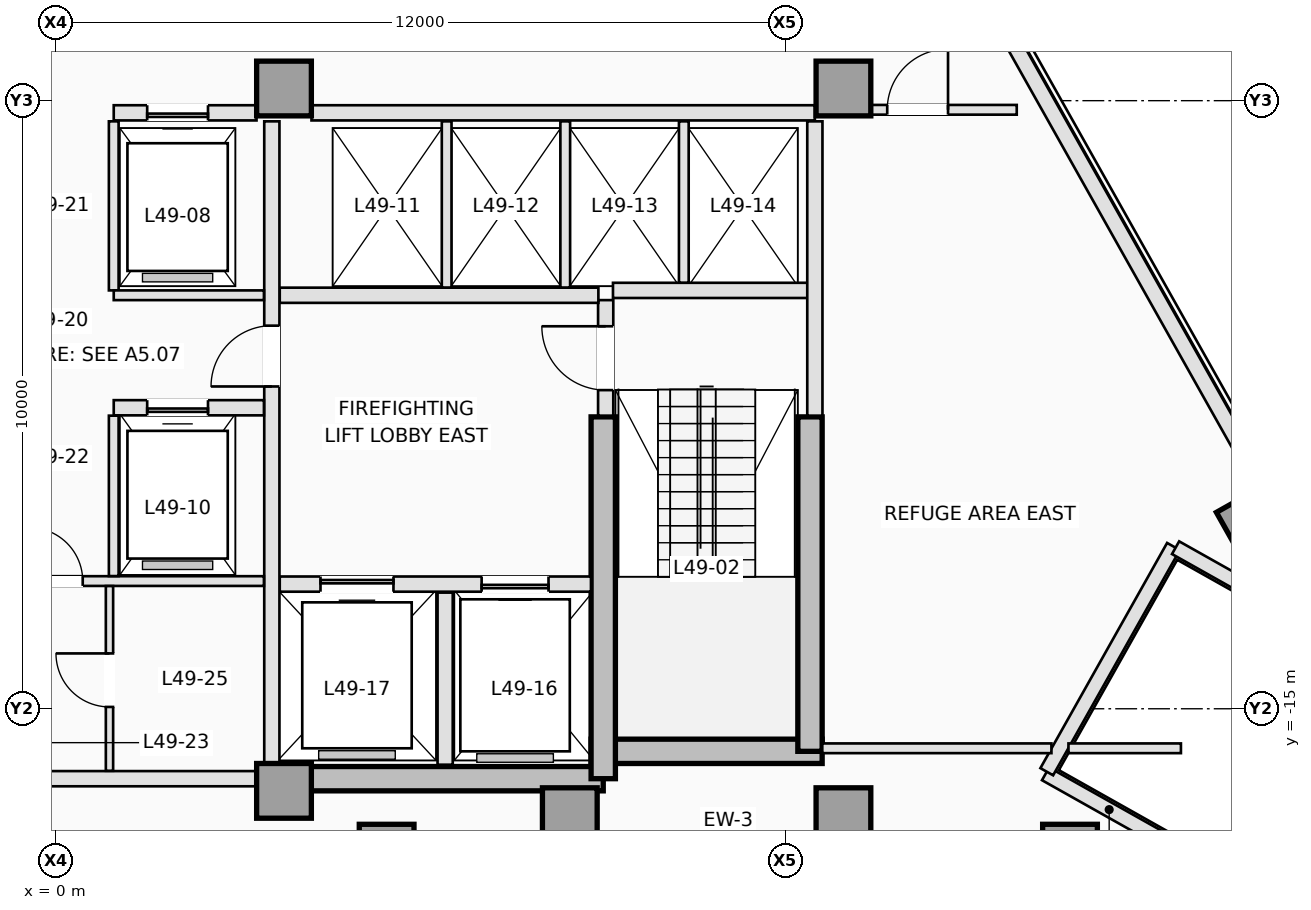
"""IFC4 building model, lengths in metres.
Left out: names, types, materials, properties, quantities, classifications, styles, units other than length and angle.
Written with IfcOpenShell. Run it as: python <this file> out.ifc"""

import sys

from ifc_helpers import new_model, si_unit, direction, frame, frame_2d, origin, origin_2d, place, context, subcontext, project, spatial, rectangle, extrude, element, fill, save


model = new_model("IFC4")
c1 = context("Model", 3, precision=1e-05, world=origin(), true_north=direction((0.0, 1.0)))
c2 = subcontext(c1, "Body", "Model", "MODEL_VIEW")
j1 = project(units=[si_unit("LENGTHUNIT", "METRE"), si_unit("PLANEANGLEUNIT", "RADIAN")], contexts=[c1])
p1 = place(None, origin())
s1 = spatial("IfcSite", under=j1, at=p1, CompositionType="ELEMENT")
p2 = place(p1, origin())
s2 = spatial("IfcBuilding", under=s1, at=p2, CompositionType="ELEMENT")
p3 = place(p2, frame((0.0, 0.0, 179.0)))
s3 = spatial("IfcBuildingStorey", under=s2, at=p3, CompositionType="ELEMENT", Elevation=179.0)
p4 = place(p3, frame((3.75, -16.15, 0.0), z_axis=(0.0, 0.0, 1.0), x_axis=(1.0, 0.0, 0.0)))
e1 = element("IfcWall", 1, at=p4, inside=s3, PredefinedType="SHEAR", context=c2, shape_type="SweptSolid", body=[
    extrude(rectangle(XDim=5.25, YDim=0.4, at=frame_2d((2.625, 0.0))), origin(), (0.0, 0.0, 1.0), 4.4),
])
p5 = place(p3, frame((8.8, -15.7, 0.0), z_axis=(0.0, 0.0, 1.0), x_axis=(1.0, 0.0, 0.0)))
e2 = element("IfcWall", 2, at=p5, inside=s3, PredefinedType="SHEAR", context=c2, shape_type="SweptSolid", body=[
    extrude(rectangle(XDim=3.8, YDim=0.4, at=frame_2d((1.9, 0.0))), origin(), (0.0, 0.0, 1.0), 4.4),
])
p6 = place(p3, frame((12.4, -15.7, 0.0), z_axis=(0.0, 0.0, 1.0), x_axis=(0.0, 1.0, 0.0)))
e3 = element("IfcWall", 3, at=p6, inside=s3, PredefinedType="SHEAR", context=c2, shape_type="SweptSolid", body=[
    extrude(rectangle(XDim=5.5, YDim=0.4, at=frame_2d((2.75, 0.0))), origin(), (0.0, 0.0, 1.0), 4.4),
])
p7 = place(p3, frame((9.0, -16.15, 0.0), z_axis=(0.0, 0.0, 1.0), x_axis=(0.0, 1.0, 0.0)))
e4 = element("IfcWall", 4, at=p7, inside=s3, PredefinedType="SHEAR", context=c2, shape_type="SweptSolid", body=[
    extrude(rectangle(XDim=5.95, YDim=0.4, at=frame_2d((2.975, 0.0))), origin(), (0.0, 0.0, 1.0), 4.4),
])
for number, where, z_axis, x_axis in (
    (5, (3.75, -16.35, 0.0), (0.0, 0.0, 1.0), (1.0, 0.0, 0.0)),
    (6, (8.45, -16.75, 0.0), (0.0, 0.0, 1.0), (1.0, 0.0, 0.0)),
    (7, (12.95, -16.75, 0.0), (0.0, 0.0, 1.0), (1.0, 0.0, 0.0)),
    (8, (3.75, -4.8, 0.0), (0.0, 0.0, 1.0), (1.0, 0.0, 0.0)),
    (9, (12.95, -4.8, 0.0), (0.0, 0.0, 1.0), (1.0, 0.0, 0.0)),
    (10, (5.438, -17.35, 0.0), (0.0, 0.0, 1.0), (0.0, 1.0, 0.0)),
    (11, (16.676, -17.35, 0.0), (0.0, 0.0, 1.0), (0.0, 1.0, 0.0)),
    (12, (19.697, -11.942, 0.0), (0.0, 0.0, 1.0), (0.872, 0.49, 0.0)),
):
    element("IfcColumn", number, at=place(p3, frame(where, z_axis=z_axis, x_axis=x_axis)), inside=s3, PredefinedType="COLUMN", context=c2, shape_type="SweptSolid", body=[
        extrude(rectangle(XDim=0.9, YDim=0.9, at=origin_2d()), origin(), (0.0, 0.0, 1.0), 4.4),
    ])
p8 = place(p3, frame((14.671, -2.14, 0.0), z_axis=(0.0, 0.0, 1.0), x_axis=(0.490246958575, -0.871583570066, 0.0)))
e13 = element("IfcWall", 13, at=p8, inside=s3, PredefinedType="STANDARD", context=c2, shape_type="SweptSolid", body=[
    extrude(rectangle(XDim=10.552, YDim=0.26, at=frame_2d((5.276, 0.0))), origin(), (0.0, 0.0, 1.0), 4.15),
])
p9 = place(p3, frame((18.366, -17.247, 0.0), z_axis=(0.0, 0.0, 1.0), x_axis=(-0.871597270235, 0.490222600988, 0.0)))
e14 = element("IfcWall", 14, at=p9, inside=s3, PredefinedType="STANDARD", context=c2, shape_type="SweptSolid", body=[
    extrude(rectangle(XDim=2.4, YDim=0.24, at=frame_2d((1.2, 0.0))), origin(), (0.0, 0.0, 1.0), 4.15),
])
p10 = place(p3, frame((16.294, -16.035, 0.0), z_axis=(0.0, 0.0, 1.0), x_axis=(0.49027487746, 0.871567865706, 0.0)))
e15 = element("IfcWall", 15, at=p10, inside=s3, PredefinedType="STANDARD", context=c2, shape_type="SweptSolid", body=[
    extrude(rectangle(XDim=4.25, YDim=0.24, at=frame_2d((2.125, 0.0))), origin(), (0.0, 0.0, 1.0), 3.226),
])
p11 = place(p3, frame((18.412, -12.351, 0.0), z_axis=(0.0, 0.0, 1.0), x_axis=(0.871578299909, -0.490256327984, 0.0)))
e16 = element("IfcWall", 16, at=p11, inside=s3, PredefinedType="STANDARD", context=c2, shape_type="SweptSolid", body=[
    extrude(rectangle(XDim=2.36, YDim=0.24, at=frame_2d((1.18, 0.0))), origin(), (0.0, 0.0, 1.0), 4.15),
])
p12 = place(p3, frame((9.04, -10.18, 0.0), z_axis=(0.0, 0.0, 1.0), x_axis=(0.0, 1.0, 0.0)))
e17 = element("IfcWall", 17, at=p12, inside=s3, PredefinedType="PARTITIONING", context=c2, shape_type="SweptSolid", body=[
    extrude(rectangle(XDim=1.9, YDim=0.25, at=frame_2d((0.95, 0.0))), origin(), (0.0, 0.0, 1.0), 4.15),
])
p13 = place(p12, frame((0.42, 0.0, 0.0)))
e18 = element("IfcOpeningElement", 18, at=p13, cuts=e17, PredefinedType="OPENING", context=c2, shape_type="SweptSolid", body=[
    extrude(rectangle(XDim=1.05, YDim=2.15, at=frame_2d((0.525, 1.075))), frame((0.0, 0.135, 0.0), z_axis=(0.0, -1.0, 0.0), x_axis=(1.0, 0.0, 0.0)), (0.0, 0.0, 1.0), 0.27),
])
p14 = place(p3, frame((9.16, -8.12, 0.0), z_axis=(0.0, 0.0, 1.0), x_axis=(1.0, 0.0, 0.0)))
e19 = element("IfcWall", 19, at=p14, inside=s3, PredefinedType="PARTITIONING", context=c2, shape_type="SweptSolid", body=[
    extrude(rectangle(XDim=3.22, YDim=0.25, at=frame_2d((1.61, 0.0))), origin(), (0.0, 0.0, 1.0), 4.15),
])
p15 = place(p3, frame((12.48, -10.18, 0.0), z_axis=(0.0, 0.0, 1.0), x_axis=(0.0, 1.0, 0.0)))
e20 = element("IfcWall", 20, at=p15, inside=s3, PredefinedType="PARTITIONING", context=c2, shape_type="SweptSolid", body=[
    extrude(rectangle(XDim=4.84, YDim=0.25, at=frame_2d((2.42, 0.0))), origin(), (0.0, 0.0, 1.0), 4.15),
])
p16 = place(p3, frame((3.68, -12.95, 0.0), z_axis=(0.0, 0.0, 1.0), x_axis=(1.0, 0.0, 0.0)))
e21 = element("IfcWall", 21, at=p16, inside=s3, PredefinedType="PARTITIONING", context=c2, shape_type="SweptSolid", body=[
    extrude(rectangle(XDim=5.118, YDim=0.25, at=frame_2d((2.559, 0.0))), origin(), (0.0, 0.0, 1.0), 4.15),
])
p17 = place(p16, frame((3.32, 0.0, 0.0)))
e22 = element("IfcOpeningElement", 22, at=p17, cuts=e21, PredefinedType="OPENING", context=c2, shape_type="SweptSolid", body=[
    extrude(rectangle(XDim=1.1, YDim=2.15, at=frame_2d((0.55, 1.075))), frame((0.0, 0.135, 0.0), z_axis=(0.0, -1.0, 0.0), x_axis=(1.0, 0.0, 0.0)), (0.0, 0.0, 1.0), 0.27),
])
p18 = place(p16, frame((0.67, 0.0, 0.0)))
e23 = element("IfcOpeningElement", 23, at=p18, cuts=e21, PredefinedType="OPENING", context=c2, shape_type="SweptSolid", body=[
    extrude(rectangle(XDim=1.2, YDim=2.15, at=frame_2d((0.6, 1.075))), frame((0.0, 0.135, 0.0), z_axis=(0.0, -1.0, 0.0), x_axis=(1.0, 0.0, 0.0)), (0.0, 0.0, 1.0), 0.27),
])
p19 = place(p3, frame((6.4, -15.92, 0.0), z_axis=(0.0, 0.0, 1.0), x_axis=(0.0, 1.0, 0.0)))
e24 = element("IfcWall", 24, at=p19, inside=s3, PredefinedType="PARTITIONING", context=c2, shape_type="SweptSolid", body=[
    extrude(rectangle(XDim=2.83, YDim=0.25, at=frame_2d((1.415, 0.0))), origin(), (0.0, 0.0, 1.0), 4.15),
])
p20 = place(p3, frame((3.68, -8.2, 0.0), z_axis=(0.0, 0.0, 1.0), x_axis=(1.0, 0.0, 0.0)))
e25 = element("IfcWall", 25, at=p20, inside=s3, PredefinedType="PARTITIONING", context=c2, shape_type="SweptSolid", body=[
    extrude(rectangle(XDim=5.24, YDim=0.25, at=frame_2d((2.62, 0.0))), origin(), (0.0, 0.0, 1.0), 4.15),
])
p21 = place(p3, frame((3.55, -15.898, 0.0), z_axis=(0.0, 0.0, 1.0), x_axis=(0.0, 1.0, 0.0)))
e26 = element("IfcWall", 26, at=p21, inside=s3, PredefinedType="PARTITIONING", context=c2, shape_type="SweptSolid", body=[
    extrude(rectangle(XDim=10.558, YDim=0.25, at=frame_2d((5.279, 0.0))), origin(), (0.0, 0.0, 1.0), 4.15),
])
p22 = place(p21, frame((6.198, 0.0, 0.0)))
e27 = element("IfcOpeningElement", 27, at=p22, cuts=e26, PredefinedType="OPENING", context=c2, shape_type="SweptSolid", body=[
    extrude(rectangle(XDim=1.0, YDim=2.15, at=frame_2d((0.5, 1.075))), frame((0.0, 0.135, 0.0), z_axis=(0.0, -1.0, 0.0), x_axis=(1.0, 0.0, 0.0)), (0.0, 0.0, 1.0), 0.27),
])
p23 = place(p3, frame((4.202, -5.2, 0.0), z_axis=(0.0, 0.0, 1.0), x_axis=(1.0, 0.0, 0.0)))
e28 = element("IfcWall", 28, at=p23, inside=s3, PredefinedType="PARTITIONING", context=c2, shape_type="SweptSolid", body=[
    extrude(rectangle(XDim=8.278, YDim=0.25, at=frame_2d((4.139, 0.0))), origin(), (0.0, 0.0, 1.0), 4.15),
])
p24 = place(p3, frame((0.95, -5.2, 0.0), z_axis=(0.0, 0.0, 1.0), x_axis=(1.0, 0.0, 0.0)))
e29 = element("IfcWall", 29, at=p24, inside=s3, PredefinedType="PARTITIONING", context=c2, shape_type="SweptSolid", body=[
    extrude(rectangle(XDim=2.348, YDim=0.25, at=frame_2d((1.174, 0.0))), origin(), (0.0, 0.0, 1.0), 4.15),
])
p25 = place(p24, frame((0.55, 0.0, 0.0)))
e30 = element("IfcOpeningElement", 30, at=p25, cuts=e29, PredefinedType="OPENING", context=c2, shape_type="SweptSolid", body=[
    extrude(rectangle(XDim=1.0, YDim=2.15, at=frame_2d((0.5, 1.075))), frame((0.0, 0.135, 0.0), z_axis=(0.0, -1.0, 0.0), x_axis=(1.0, 0.0, 0.0)), (0.0, 0.0, 1.0), 0.27),
])
for number, where, z_axis, x_axis in (
    (31, (6.425, -8.073, 0.0), (0.0, 0.0, 1.0), (0.0, 1.0, 0.0)),
    (32, (8.375, -8.073, 0.0), (0.0, 0.0, 1.0), (0.0, 1.0, 0.0)),
):
    element("IfcWall", number, at=place(p3, frame(where, z_axis=z_axis, x_axis=x_axis)), inside=s3, PredefinedType="PARTITIONING", context=c2, shape_type="SweptSolid", body=[
        extrude(rectangle(XDim=2.733, YDim=0.16, at=frame_2d((1.366, 0.0))), origin(), (0.0, 0.0, 1.0), 4.15),
    ])
p26 = place(p3, frame((10.325, -7.993, 0.0), z_axis=(0.0, 0.0, 1.0), x_axis=(0.0, 1.0, 0.0)))
e33 = element("IfcWall", 33, at=p26, inside=s3, PredefinedType="PARTITIONING", context=c2, shape_type="SweptSolid", body=[
    extrude(rectangle(XDim=2.653, YDim=0.16, at=frame_2d((1.326, 0.0))), origin(), (0.0, 0.0, 1.0), 4.15),
])
p27 = place(p3, frame((-3.298, -16.15, 0.0), z_axis=(0.0, 0.0, 1.0), x_axis=(1.0, 0.0, 0.0)))
e34 = element("IfcWall", 34, at=p27, inside=s3, PredefinedType="PARTITIONING", context=c2, shape_type="SweptSolid", body=[
    extrude(rectangle(XDim=6.596, YDim=0.25, at=frame_2d((3.298, 0.0))), origin(), (0.0, 0.0, 1.0), 3.35),
])
p28 = place(p3, frame((0.95, -8.12, 0.0), z_axis=(0.0, 0.0, 1.0), x_axis=(0.0, 1.0, 0.0)))
e35 = element("IfcWall", 35, at=p28, inside=s3, PredefinedType="PARTITIONING", context=c2, shape_type="SweptSolid", body=[
    extrude(rectangle(XDim=2.78, YDim=0.16, at=frame_2d((1.39, 0.0))), origin(), (0.0, 0.0, 1.0), 4.15),
])
p29 = place(p3, frame((0.95, -8.2, 0.0), z_axis=(0.0, 0.0, 1.0), x_axis=(1.0, 0.0, 0.0)))
e36 = element("IfcWall", 36, at=p29, inside=s3, PredefinedType="PARTITIONING", context=c2, shape_type="SweptSolid", body=[
    extrude(rectangle(XDim=2.47, YDim=0.16, at=frame_2d((1.235, 0.0))), origin(), (0.0, 0.0, 1.0), 4.15),
])
p30 = place(p3, frame((0.95, -10.05, 0.0), z_axis=(0.0, 0.0, 1.0), x_axis=(1.0, 0.0, 0.0)))
e37 = element("IfcWall", 37, at=p30, inside=s3, PredefinedType="PARTITIONING", context=c2, shape_type="SweptSolid", body=[
    extrude(rectangle(XDim=2.47, YDim=0.25, at=frame_2d((1.235, 0.0))), origin(), (0.0, 0.0, 1.0), 4.15),
])
p31 = place(p30, frame((0.55, 0.0, 0.0)))
e38 = element("IfcOpeningElement", 38, at=p31, cuts=e37, PredefinedType="OPENING", context=c2, shape_type="SweptSolid", body=[
    extrude(rectangle(XDim=1.0, YDim=2.15, at=frame_2d((0.5, 1.075))), frame((0.0, 0.135, 0.0), z_axis=(0.0, -1.0, 0.0), x_axis=(1.0, 0.0, 0.0)), (0.0, 0.0, 1.0), 0.27),
])
p32 = place(p3, frame((-3.42, -12.9, 0.0), z_axis=(0.0, 0.0, 1.0), x_axis=(1.0, 0.0, 0.0)))
e39 = element("IfcWall", 39, at=p32, inside=s3, PredefinedType="PARTITIONING", context=c2, shape_type="SweptSolid", body=[
    extrude(rectangle(XDim=6.84, YDim=0.16, at=frame_2d((3.42, 0.0))), origin(), (0.0, 0.0, 1.0), 4.15),
])
p33 = place(p32, frame((2.98, 0.0, 0.0)))
e40 = element("IfcOpeningElement", 40, at=p33, cuts=e39, PredefinedType="OPENING", context=c2, shape_type="SweptSolid", body=[
    extrude(rectangle(XDim=0.88, YDim=2.12, at=frame_2d((0.44, 1.06))), frame((0.0, 0.09, 0.0), z_axis=(0.0, -1.0, 0.0), x_axis=(1.0, 0.0, 0.0)), (0.0, 0.0, 1.0), 0.18),
])
p34 = place(p3, frame((0.95, -12.818, 0.0), z_axis=(0.0, 0.0, 1.0), x_axis=(0.0, 1.0, 0.0)))
e41 = element("IfcWall", 41, at=p34, inside=s3, PredefinedType="PARTITIONING", context=c2, shape_type="SweptSolid", body=[
    extrude(rectangle(XDim=2.638, YDim=0.16, at=frame_2d((1.319, 0.0))), origin(), (0.0, 0.0, 1.0), 4.15),
])
p35 = place(p3, frame((0.88, -16.02, 0.0), z_axis=(0.0, 0.0, 1.0), x_axis=(0.0, 1.0, 0.0)))
e42 = element("IfcWall", 42, at=p35, inside=s3, PredefinedType="PARTITIONING", context=c2, shape_type="SweptSolid", body=[
    extrude(rectangle(XDim=3.038, YDim=0.12, at=frame_2d((1.519, 0.0))), origin(), (0.0, 0.0, 1.0), 4.15),
])
p36 = place(p35, frame((1.05, 0.0, 0.0)))
e43 = element("IfcOpeningElement", 43, at=p36, cuts=e42, PredefinedType="OPENING", context=c2, shape_type="SweptSolid", body=[
    extrude(rectangle(XDim=0.88, YDim=2.12, at=frame_2d((0.44, 1.06))), frame((0.0, 0.07, 0.0), z_axis=(0.0, -1.0, 0.0), x_axis=(1.0, 0.0, 0.0)), (0.0, 0.0, 1.0), 0.14),
])
p37 = place(p3, frame((12.602, -15.65, 0.0), z_axis=(0.0, 0.0, 1.0), x_axis=(1.0, 0.0, 0.0)))
e44 = element("IfcWall", 44, at=p37, inside=s3, PredefinedType="PARTITIONING", context=c2, shape_type="SweptSolid", body=[
    extrude(rectangle(XDim=3.769, YDim=0.16, at=frame_2d((1.884, 0.0))), origin(), (0.0, 0.0, 1.0), 4.15),
])
p38 = place(p3, frame((16.651, -15.65, 0.0), z_axis=(0.0, 0.0, 1.0), x_axis=(1.0, 0.0, 0.0)))
e45 = element("IfcWall", 45, at=p38, inside=s3, PredefinedType="PARTITIONING", context=c2, shape_type="SweptSolid", body=[
    extrude(rectangle(XDim=1.849, YDim=0.16, at=frame_2d((0.925, 0.0))), origin(), (0.0, 0.0, 1.0), 4.15),
])
p39 = place(p3, frame((13.402, -5.15, 0.0), z_axis=(0.0, 0.0, 1.0), x_axis=(1.0, 0.0, 0.0)))
e46 = element("IfcWall", 46, at=p39, inside=s3, PredefinedType="PARTITIONING", context=c2, shape_type="SweptSolid", body=[
    extrude(rectangle(XDim=2.398, YDim=0.16, at=frame_2d((1.199, 0.0))), origin(), (0.0, 0.0, 1.0), 4.15),
])
p40 = place(p39, frame((0.268, 0.0, 0.0)))
e47 = element("IfcOpeningElement", 47, at=p40, cuts=e46, PredefinedType="OPENING", context=c2, shape_type="SweptSolid", body=[
    extrude(rectangle(XDim=1.0, YDim=2.15, at=frame_2d((0.5, 1.075))), frame((0.0, 0.09, 0.0), z_axis=(0.0, -1.0, 0.0), x_axis=(1.0, 0.0, 0.0)), (0.0, 0.0, 1.0), 0.18),
])
p41 = place(p25, origin())
e48 = element("IfcDoor", 48, at=p41, inside=s3, OperationType="SLIDING_TO_RIGHT", PredefinedType="DOOR", context=c2, shape_type="SweptSolid", body=[
    extrude(rectangle(XDim=1.0, YDim=2.15, at=frame_2d((0.5, 1.075))), frame((0.0, 0.025, 0.0), z_axis=(0.0, -1.0, 0.0), x_axis=(1.0, 0.0, 0.0)), (0.0, 0.0, 1.0), 0.05),
])
fill(e30, e48)
p42 = place(p17, origin())
e49 = element("IfcDoor", 49, at=p42, inside=s3, OperationType="SLIDING_TO_RIGHT", PredefinedType="DOOR", context=c2, shape_type="SweptSolid", body=[
    extrude(rectangle(XDim=1.1, YDim=2.15, at=frame_2d((0.55, 1.075))), frame((0.0, 0.025, 0.0), z_axis=(0.0, -1.0, 0.0), x_axis=(1.0, 0.0, 0.0)), (0.0, 0.0, 1.0), 0.05),
])
fill(e22, e49)
p43 = place(p18, origin())
e50 = element("IfcDoor", 50, at=p43, inside=s3, OperationType="SLIDING_TO_LEFT", PredefinedType="DOOR", context=c2, shape_type="SweptSolid", body=[
    extrude(rectangle(XDim=1.2, YDim=2.15, at=frame_2d((0.6, 1.075))), frame((0.0, 0.025, 0.0), z_axis=(0.0, -1.0, 0.0), x_axis=(1.0, 0.0, 0.0)), (0.0, 0.0, 1.0), 0.05),
])
fill(e23, e50)
p44 = place(p31, origin())
e51 = element("IfcDoor", 51, at=p44, inside=s3, OperationType="SLIDING_TO_RIGHT", PredefinedType="DOOR", context=c2, shape_type="SweptSolid", body=[
    extrude(rectangle(XDim=1.0, YDim=2.15, at=frame_2d((0.5, 1.075))), frame((0.0, 0.025, 0.0), z_axis=(0.0, -1.0, 0.0), x_axis=(1.0, 0.0, 0.0)), (0.0, 0.0, 1.0), 0.05),
])
fill(e38, e51)
p45 = place(p13, origin())
e52 = element("IfcDoor", 52, at=p45, inside=s3, OperationType="SINGLE_SWING_RIGHT", PredefinedType="DOOR", context=c2, shape_type="SweptSolid", body=[
    extrude(rectangle(XDim=1.05, YDim=2.15, at=frame_2d((0.525, 1.075))), frame((0.0, 0.025, 0.0), z_axis=(0.0, -1.0, 0.0), x_axis=(1.0, 0.0, 0.0)), (0.0, 0.0, 1.0), 0.05),
])
fill(e18, e52)
p46 = place(p22, origin())
e53 = element("IfcDoor", 53, at=p46, inside=s3, OperationType="SINGLE_SWING_LEFT", PredefinedType="DOOR", context=c2, shape_type="SweptSolid", body=[
    extrude(rectangle(XDim=1.0, YDim=2.15, at=frame_2d((0.5, 1.075))), frame((0.0, 0.025, 0.0), z_axis=(0.0, -1.0, 0.0), x_axis=(1.0, 0.0, 0.0)), (0.0, 0.0, 1.0), 0.05),
])
fill(e27, e53)
p47 = place(p33, origin())
e54 = element("IfcDoor", 54, at=p47, inside=s3, OperationType="SINGLE_SWING_LEFT", PredefinedType="DOOR", context=c2, shape_type="SweptSolid", body=[
    extrude(rectangle(XDim=0.88, YDim=2.12, at=frame_2d((0.44, 1.06))), frame((0.0, 0.025, 0.0), z_axis=(0.0, -1.0, 0.0), x_axis=(1.0, 0.0, 0.0)), (0.0, 0.0, 1.0), 0.05),
])
fill(e40, e54)
p48 = place(p36, origin())
e55 = element("IfcDoor", 55, at=p48, inside=s3, OperationType="SINGLE_SWING_RIGHT", PredefinedType="DOOR", context=c2, shape_type="SweptSolid", body=[
    extrude(rectangle(XDim=0.88, YDim=2.12, at=frame_2d((0.44, 1.06))), frame((0.0, 0.025, 0.0), z_axis=(0.0, -1.0, 0.0), x_axis=(1.0, 0.0, 0.0)), (0.0, 0.0, 1.0), 0.05),
])
fill(e43, e55)
p49 = place(p40, origin())
e56 = element("IfcDoor", 56, at=p49, inside=s3, OperationType="SINGLE_SWING_RIGHT", PredefinedType="DOOR", context=c2, shape_type="SweptSolid", body=[
    extrude(rectangle(XDim=1.0, YDim=2.15, at=frame_2d((0.5, 1.075))), frame((0.0, 0.025, 0.0), z_axis=(0.0, -1.0, 0.0), x_axis=(1.0, 0.0, 0.0)), (0.0, 0.0, 1.0), 0.05),
])
fill(e47, e56)
save(model, sys.argv[1])
